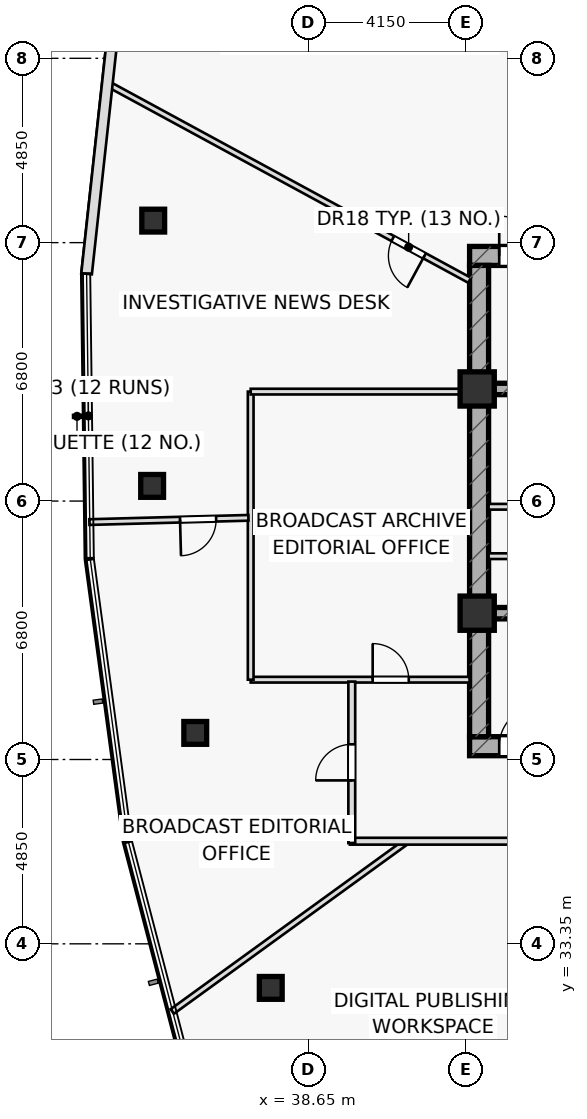
"""IFC4 building model, lengths in metres.
Left out: names, types, materials, properties, quantities, classifications, styles, units other than length and angle.
Written with IfcOpenShell. Run it as: python <this file> out.ifc"""

import sys

from ifc_helpers import new_model, si_unit, direction, frame, frame_2d, origin, origin_2d, place, context, subcontext, project, spatial, rectangle, hollow_rectangle, extrude, element, fill, save


model = new_model("IFC4")
c1 = context("Model", 3, precision=1e-05, world=origin(), true_north=direction((0.0, 1.0)))
c2 = subcontext(c1, "Body", "Model", "MODEL_VIEW")
j1 = project(units=[si_unit("LENGTHUNIT", "METRE"), si_unit("PLANEANGLEUNIT", "RADIAN")], contexts=[c1])
p1 = place(None, origin())
s1 = spatial("IfcSite", under=j1, at=p1, CompositionType="ELEMENT")
p2 = place(p1, origin())
s2 = spatial("IfcBuilding", under=s1, at=p2, CompositionType="ELEMENT")
p3 = place(p2, frame((0.0, 0.0, 177.2)))
s3 = spatial("IfcBuildingStorey", under=s2, at=p3, CompositionType="ELEMENT", Elevation=177.2)
p4 = place(p3, frame((42.9, 51.45, 0.0), z_axis=(0.0, 0.0, 1.0), x_axis=(1.0, 0.0, 0.0)))
e1 = element("IfcWall", 1, at=p4, inside=s3, PredefinedType="SHEAR", context=c2, shape_type="SweptSolid", body=[
    extrude(rectangle(XDim=14.2, YDim=0.5, at=frame_2d((7.1, 0.0))), origin(), (0.0, 0.0, 1.0), 3.55),
])
p5 = place(p4, frame((0.78, 0.0, 0.0)))
e2 = element("IfcOpeningElement", 2, at=p5, cuts=e1, PredefinedType="OPENING", context=c2, shape_type="SweptSolid", body=[
    extrude(rectangle(XDim=1.05, YDim=2.2, at=frame_2d((0.525, 1.1))), frame((0.0, 0.26, 0.0), z_axis=(0.0, -1.0, 0.0), x_axis=(1.0, 0.0, 0.0)), (0.0, 0.0, 1.0), 0.52),
])
p6 = place(p3, frame((42.9, 38.55, 0.0), z_axis=(0.0, 0.0, 1.0), x_axis=(1.0, 0.0, 0.0)))
e3 = element("IfcWall", 3, at=p6, inside=s3, PredefinedType="SHEAR", context=c2, shape_type="SweptSolid", body=[
    extrude(rectangle(XDim=14.2, YDim=0.5, at=frame_2d((7.1, 0.0))), origin(), (0.0, 0.0, 1.0), 3.55),
])
p7 = place(p6, frame((0.78, 0.0, 0.0)))
e4 = element("IfcOpeningElement", 4, at=p7, cuts=e3, PredefinedType="OPENING", context=c2, shape_type="SweptSolid", body=[
    extrude(rectangle(XDim=1.05, YDim=2.2, at=frame_2d((0.525, 1.1))), frame((0.0, 0.26, 0.0), z_axis=(0.0, -1.0, 0.0), x_axis=(1.0, 0.0, 0.0)), (0.0, 0.0, 1.0), 0.52),
])
p8 = place(p3, frame((43.15, 38.8, 0.0), z_axis=(0.0, 0.0, 1.0), x_axis=(0.0, 1.0, 0.0)))
e5 = element("IfcWall", 5, at=p8, inside=s3, PredefinedType="SHEAR", context=c2, shape_type="SweptSolid", body=[
    extrude(rectangle(XDim=12.4, YDim=0.5, at=frame_2d((6.2, 0.0))), origin(), (0.0, 0.0, 1.0), 3.55),
])
p9 = place(p3, frame((43.4, 47.95, 0.0), z_axis=(0.0, 0.0, 1.0), x_axis=(1.0, 0.0, 0.0)))
e6 = element("IfcWall", 6, at=p9, inside=s3, PredefinedType="SHEAR", context=c2, shape_type="SweptSolid", body=[
    extrude(rectangle(XDim=13.2, YDim=0.3, at=frame_2d((6.6, 0.0))), origin(), (0.0, 0.0, 1.0), 3.55),
])
p10 = place(p9, frame((8.345, 0.0, 0.0)))
e7 = element("IfcOpeningElement", 7, at=p10, cuts=e6, PredefinedType="OPENING", context=c2, shape_type="SweptSolid", body=[
    extrude(rectangle(XDim=1.15, YDim=2.2, at=frame_2d((0.575, 1.1))), frame((0.0, 0.16, 0.0), z_axis=(0.0, -1.0, 0.0), x_axis=(1.0, 0.0, 0.0)), (0.0, 0.0, 1.0), 0.32),
])
p11 = place(p9, frame((10.065, 0.0, 0.0)))
e8 = element("IfcOpeningElement", 8, at=p11, cuts=e6, PredefinedType="OPENING", context=c2, shape_type="SweptSolid", body=[
    extrude(rectangle(XDim=1.15, YDim=2.2, at=frame_2d((0.575, 1.1))), frame((0.0, 0.16, 0.0), z_axis=(0.0, -1.0, 0.0), x_axis=(1.0, 0.0, 0.0)), (0.0, 0.0, 1.0), 0.32),
])
p12 = place(p9, frame((11.645, 0.0, 0.0)))
e9 = element("IfcOpeningElement", 9, at=p12, cuts=e6, PredefinedType="OPENING", context=c2, shape_type="SweptSolid", body=[
    extrude(rectangle(XDim=1.15, YDim=2.2, at=frame_2d((0.575, 1.1))), frame((0.0, 0.16, 0.0), z_axis=(0.0, -1.0, 0.0), x_axis=(1.0, 0.0, 0.0)), (0.0, 0.0, 1.0), 0.32),
])
p13 = place(p3, frame((43.4, 42.05, 0.0), z_axis=(0.0, 0.0, 1.0), x_axis=(1.0, 0.0, 0.0)))
e10 = element("IfcWall", 10, at=p13, inside=s3, PredefinedType="SHEAR", context=c2, shape_type="SweptSolid", body=[
    extrude(rectangle(XDim=13.2, YDim=0.3, at=frame_2d((6.6, 0.0))), origin(), (0.0, 0.0, 1.0), 3.55),
])
p14 = place(p13, frame((8.37, 0.0, 0.0)))
e11 = element("IfcOpeningElement", 11, at=p14, cuts=e10, PredefinedType="OPENING", context=c2, shape_type="SweptSolid", body=[
    extrude(rectangle(XDim=1.1, YDim=2.15, at=frame_2d((0.55, 1.075))), frame((0.0, 0.16, 0.0), z_axis=(0.0, -1.0, 0.0), x_axis=(1.0, 0.0, 0.0)), (0.0, 0.0, 1.0), 0.32),
])
p15 = place(p13, frame((10.09, 0.0, 0.0)))
e12 = element("IfcOpeningElement", 12, at=p15, cuts=e10, PredefinedType="OPENING", context=c2, shape_type="SweptSolid", body=[
    extrude(rectangle(XDim=1.1, YDim=2.15, at=frame_2d((0.55, 1.075))), frame((0.0, 0.16, 0.0), z_axis=(0.0, -1.0, 0.0), x_axis=(1.0, 0.0, 0.0)), (0.0, 0.0, 1.0), 0.32),
])
p16 = place(p13, frame((11.83, 0.0, 0.0)))
e13 = element("IfcOpeningElement", 13, at=p16, cuts=e10, PredefinedType="OPENING", context=c2, shape_type="SweptSolid", body=[
    extrude(rectangle(XDim=1.1, YDim=2.15, at=frame_2d((0.55, 1.075))), frame((0.0, 0.16, 0.0), z_axis=(0.0, -1.0, 0.0), x_axis=(1.0, 0.0, 0.0)), (0.0, 0.0, 1.0), 0.32),
])
for number, where, z_axis, x_axis in (
    (14, (43.1, 47.95, 0.0), (0.0, 0.0, 1.0), (1.0, 0.0, 0.0)),
    (15, (43.1, 42.05, 0.0), (0.0, 0.0, 1.0), (1.0, 0.0, 0.0)),
):
    element("IfcColumn", number, at=place(p3, frame(where, z_axis=z_axis, x_axis=x_axis)), inside=s3, PredefinedType="COLUMN", context=c2, shape_type="SweptSolid", body=[
        extrude(rectangle(XDim=0.9, YDim=0.9, at=origin_2d()), origin(), (0.0, 0.0, 1.0), 3.55),
    ])
for number, where, z_axis, x_axis in (
    (16, (34.575, 52.379, 0.0), (0.0, 0.0, 1.0), (1.0, 0.0, 0.0)),
    (17, (34.546, 45.399, 0.0), (0.0, 0.0, 1.0), (1.0, 0.0, 0.0)),
    (18, (35.681, 38.9, 0.0), (0.0, 0.0, 1.0), (1.0, 0.0, 0.0)),
    (19, (37.668, 32.19, 0.0), (0.0, 0.0, 1.0), (1.0, 0.0, 0.0)),
):
    element("IfcColumn", number, at=place(p3, frame(where, z_axis=z_axis, x_axis=x_axis)), inside=s3, PredefinedType="COLUMN", context=c2, shape_type="SweptSolid", body=[
        extrude(hollow_rectangle(XDim=0.6, YDim=0.6, WallThickness=0.036, at=origin_2d()), origin(), (0.0, 0.0, 1.0), 3.55),
    ])
for number, where, z_axis, x_axis in (
    (20, (43.4, 43.55, 0.0), (0.0, 0.0, 1.0), (1.0, 0.0, 0.0)),
    (21, (43.4, 44.85, 0.0), (0.0, 0.0, 1.0), (1.0, 0.0, 0.0)),
):
    element("IfcWall", number, at=place(p3, frame(where, z_axis=z_axis, x_axis=x_axis)), inside=s3, PredefinedType="PARTITIONING", context=c2, shape_type="SweptSolid", body=[
        extrude(rectangle(XDim=2.35, YDim=0.15, at=frame_2d((1.175, 0.0))), origin(), (0.0, 0.0, 1.0), 3.55),
    ])
p17 = place(p3, frame((37.14, 40.3, 0.0), z_axis=(0.0, 0.0, 1.0), x_axis=(1.0, 0.0, 0.0)))
e22 = element("IfcWall", 22, at=p17, inside=s3, PredefinedType="PARTITIONING", context=c2, shape_type="SweptSolid", body=[
    extrude(rectangle(XDim=5.76, YDim=0.15, at=frame_2d((2.88, 0.0))), origin(), (0.0, 0.0, 1.0), 3.55),
])
p18 = place(p17, frame((3.21, 0.0, 0.0)))
e23 = element("IfcOpeningElement", 23, at=p18, cuts=e22, PredefinedType="OPENING", context=c2, shape_type="SweptSolid", body=[
    extrude(rectangle(XDim=0.95, YDim=2.05, at=frame_2d((0.475, 1.025))), frame((0.0, 0.085, 0.0), z_axis=(0.0, -1.0, 0.0), x_axis=(1.0, 0.0, 0.0)), (0.0, 0.0, 1.0), 0.17),
])
p19 = place(p3, frame((37.14, 40.3, 0.0), z_axis=(0.0, 0.0, 1.0), x_axis=(0.0, 1.0, 0.0)))
e24 = element("IfcWall", 24, at=p19, inside=s3, PredefinedType="PARTITIONING", context=c2, shape_type="SweptSolid", body=[
    extrude(rectangle(XDim=7.58, YDim=0.15, at=frame_2d((3.79, 0.0))), origin(), (0.0, 0.0, 1.0), 2.935),
])
p20 = place(p3, frame((37.14, 47.88, 0.0), z_axis=(0.0, 0.0, 1.0), x_axis=(1.0, 0.0, 0.0)))
e25 = element("IfcWall", 25, at=p20, inside=s3, PredefinedType="PARTITIONING", context=c2, shape_type="SweptSolid", body=[
    extrude(rectangle(XDim=5.76, YDim=0.15, at=frame_2d((2.88, 0.0))), origin(), (0.0, 0.0, 1.0), 2.935),
])
p21 = place(p3, frame((42.9, 50.81, 0.0), z_axis=(0.0, 0.0, 1.0), x_axis=(-0.878810866854, 0.477170263427, 0.0)))
e26 = element("IfcWall", 26, at=p21, inside=s3, PredefinedType="PARTITIONING", context=c2, shape_type="SweptSolid", body=[
    extrude(rectangle(XDim=10.858, YDim=0.15, at=frame_2d((5.429, 0.0))), origin(), (0.0, 0.0, 1.0), 2.935),
])
p22 = place(p21, frame((1.35, 0.0, 0.0)))
e27 = element("IfcOpeningElement", 27, at=p22, cuts=e26, PredefinedType="OPENING", context=c2, shape_type="SweptSolid", body=[
    extrude(rectangle(XDim=0.95, YDim=2.05, at=frame_2d((0.475, 1.025))), frame((0.0, 0.085, 0.0), z_axis=(0.0, -1.0, 0.0), x_axis=(1.0, 0.0, 0.0)), (0.0, 0.0, 1.0), 0.17),
])
p23 = place(p3, frame((37.08, 44.559, 0.0), z_axis=(0.0, 0.0, 1.0), x_axis=(-0.99964326515, -0.026708471324, 0.0)))
e28 = element("IfcWall", 28, at=p23, inside=s3, PredefinedType="PARTITIONING", context=c2, shape_type="SweptSolid", body=[
    extrude(rectangle(XDim=4.187, YDim=0.15, at=frame_2d((2.093, 0.0))), origin(), (0.0, 0.0, 1.0), 3.025),
])
p24 = place(p23, frame((0.85, 0.0, 0.0)))
e29 = element("IfcOpeningElement", 29, at=p24, cuts=e28, PredefinedType="OPENING", context=c2, shape_type="SweptSolid", body=[
    extrude(rectangle(XDim=0.95, YDim=2.05, at=frame_2d((0.475, 1.025))), frame((0.0, 0.085, 0.0), z_axis=(0.0, -1.0, 0.0), x_axis=(1.0, 0.0, 0.0)), (0.0, 0.0, 1.0), 0.17),
])
p25 = place(p3, frame((41.256, 36.05, 0.0), z_axis=(0.0, 0.0, 1.0), x_axis=(-0.809606643128, -0.586972813172, 0.0)))
e30 = element("IfcWall", 30, at=p25, inside=s3, PredefinedType="PARTITIONING", context=c2, shape_type="SweptSolid", body=[
    extrude(rectangle(XDim=7.632, YDim=0.15, at=frame_2d((3.816, 0.0))), origin(), (0.0, 0.0, 1.0), 2.935),
])
p26 = place(p3, frame((48.911, 36.05, 0.0), z_axis=(0.0, 0.0, 1.0), x_axis=(-0.464058704917, -0.885804447037, 0.0)))
e31 = element("IfcWall", 31, at=p26, inside=s3, PredefinedType="PARTITIONING", context=c2, shape_type="SweptSolid", body=[
    extrude(rectangle(XDim=18.7, YDim=0.15, at=frame_2d((9.35, 0.0))), origin(), (0.0, 0.0, 1.0), 2.935),
])
p27 = place(p3, frame((46.896, 54.45, 0.0), z_axis=(0.0, 0.0, 1.0), x_axis=(-0.578628204747, 0.81559144225, 0.0)))
e32 = element("IfcWall", 32, at=p27, inside=s3, PredefinedType="PARTITIONING", context=c2, shape_type="SweptSolid", body=[
    extrude(rectangle(XDim=17.283, YDim=0.15, at=frame_2d((8.642, 0.0))), origin(), (0.0, 0.0, 1.0), 2.935),
])
p28 = place(p27, frame((1.35, 0.0, 0.0)))
e33 = element("IfcOpeningElement", 33, at=p28, cuts=e32, PredefinedType="OPENING", context=c2, shape_type="SweptSolid", body=[
    extrude(rectangle(XDim=0.95, YDim=2.05, at=frame_2d((0.475, 1.025))), frame((0.0, 0.085, 0.0), z_axis=(0.0, -1.0, 0.0), x_axis=(1.0, 0.0, 0.0)), (0.0, 0.0, 1.0), 0.17),
])
p29 = place(p3, frame((59.4, 36.05, 0.0), z_axis=(0.0, 0.0, 1.0), x_axis=(-1.0, 0.0, 0.0)))
e34 = element("IfcWall", 34, at=p29, inside=s3, PredefinedType="PARTITIONING", context=c2, shape_type="SweptSolid", body=[
    extrude(rectangle(XDim=19.65, YDim=0.18, at=frame_2d((9.825, 0.0))), origin(), (0.0, 0.0, 1.0), 2.935),
])
p30 = place(p29, frame((3.374, 0.0, 0.0)))
e35 = element("IfcOpeningElement", 35, at=p30, cuts=e34, PredefinedType="OPENING", context=c2, shape_type="SweptSolid", body=[
    extrude(rectangle(XDim=0.95, YDim=2.05, at=frame_2d((0.475, 1.025))), frame((0.0, 0.1, 0.0), z_axis=(0.0, -1.0, 0.0), x_axis=(1.0, 0.0, 0.0)), (0.0, 0.0, 1.0), 0.2),
])
p31 = place(p29, frame((7.369, 0.0, 0.0)))
e36 = element("IfcOpeningElement", 36, at=p31, cuts=e34, PredefinedType="OPENING", context=c2, shape_type="SweptSolid", body=[
    extrude(rectangle(XDim=0.95, YDim=2.05, at=frame_2d((0.475, 1.025))), frame((0.0, 0.1, 0.0), z_axis=(0.0, -1.0, 0.0), x_axis=(1.0, 0.0, 0.0)), (0.0, 0.0, 1.0), 0.2),
])
p32 = place(p29, frame((13.957, 0.0, 0.0)))
e37 = element("IfcOpeningElement", 37, at=p32, cuts=e34, PredefinedType="OPENING", context=c2, shape_type="SweptSolid", body=[
    extrude(rectangle(XDim=0.95, YDim=2.05, at=frame_2d((0.475, 1.025))), frame((0.0, 0.1, 0.0), z_axis=(0.0, -1.0, 0.0), x_axis=(1.0, 0.0, 0.0)), (0.0, 0.0, 1.0), 0.2),
])
p33 = place(p3, frame((39.8, 36.0, 0.0), z_axis=(0.0, 0.0, 1.0), x_axis=(0.0, 1.0, 0.0)))
e38 = element("IfcWall", 38, at=p33, inside=s3, PredefinedType="PARTITIONING", context=c2, shape_type="SweptSolid", body=[
    extrude(rectangle(XDim=4.25, YDim=0.18, at=frame_2d((2.125, 0.0))), origin(), (0.0, 0.0, 1.0), 2.935),
])
p34 = place(p33, frame((1.65, 0.0, 0.0)))
e39 = element("IfcOpeningElement", 39, at=p34, cuts=e38, PredefinedType="OPENING", context=c2, shape_type="SweptSolid", body=[
    extrude(rectangle(XDim=0.95, YDim=2.05, at=frame_2d((0.475, 1.025))), frame((0.0, 0.1, 0.0), z_axis=(0.0, -1.0, 0.0), x_axis=(1.0, 0.0, 0.0)), (0.0, 0.0, 1.0), 0.2),
])
p35 = place(p3, frame((33.638, 58.46, 0.0), z_axis=(0.0, 0.0, 1.0), x_axis=(-0.108447510175, -0.994102176608, 0.0)))
e40 = element("IfcWall", 40, at=p35, inside=s3, PredefinedType="STANDARD", context=c2, shape_type="SweptSolid", body=[
    extrude(rectangle(XDim=7.524, YDim=0.28, at=frame_2d((3.762, 0.0))), origin(), (0.0, 0.0, 1.0), 3.55),
])
p36 = place(p5, origin())
e41 = element("IfcDoor", 41, at=p36, inside=s3, OperationType="SINGLE_SWING_LEFT", PredefinedType="DOOR", context=c2, shape_type="SweptSolid", body=[
    extrude(rectangle(XDim=1.05, YDim=2.2, at=frame_2d((0.525, 1.1))), frame((0.0, 0.025, 0.0), z_axis=(0.0, -1.0, 0.0), x_axis=(1.0, 0.0, 0.0)), (0.0, 0.0, 1.0), 0.05),
])
fill(e2, e41)
p37 = place(p7, origin())
e42 = element("IfcDoor", 42, at=p37, inside=s3, OperationType="SINGLE_SWING_RIGHT", PredefinedType="DOOR", context=c2, shape_type="SweptSolid", body=[
    extrude(rectangle(XDim=1.05, YDim=2.2, at=frame_2d((0.525, 1.1))), frame((0.0, 0.025, 0.0), z_axis=(0.0, -1.0, 0.0), x_axis=(1.0, 0.0, 0.0)), (0.0, 0.0, 1.0), 0.05),
])
fill(e4, e42)
p38 = place(p18, origin())
e43 = element("IfcDoor", 43, at=p38, inside=s3, OperationType="SINGLE_SWING_LEFT", PredefinedType="DOOR", context=c2, shape_type="SweptSolid", body=[
    extrude(rectangle(XDim=0.95, YDim=2.05, at=frame_2d((0.475, 1.025))), frame((0.0, 0.025, 0.0), z_axis=(0.0, -1.0, 0.0), x_axis=(1.0, 0.0, 0.0)), (0.0, 0.0, 1.0), 0.05),
])
fill(e23, e43)
p39 = place(p22, origin())
e44 = element("IfcDoor", 44, at=p39, inside=s3, OperationType="SINGLE_SWING_LEFT", PredefinedType="DOOR", context=c2, shape_type="SweptSolid", body=[
    extrude(rectangle(XDim=0.95, YDim=2.05, at=frame_2d((0.475, 1.025))), frame((0.0, 0.025, 0.0), z_axis=(0.0, -1.0, 0.0), x_axis=(1.0, 0.0, 0.0)), (0.0, 0.0, 1.0), 0.05),
])
fill(e27, e44)
p40 = place(p24, origin())
e45 = element("IfcDoor", 45, at=p40, inside=s3, OperationType="SINGLE_SWING_RIGHT", PredefinedType="DOOR", context=c2, shape_type="SweptSolid", body=[
    extrude(rectangle(XDim=0.95, YDim=2.05, at=frame_2d((0.475, 1.025))), frame((0.0, 0.025, 0.0), z_axis=(0.0, -1.0, 0.0), x_axis=(1.0, 0.0, 0.0)), (0.0, 0.0, 1.0), 0.05),
])
fill(e29, e45)
p41 = place(p34, origin())
e46 = element("IfcDoor", 46, at=p41, inside=s3, OperationType="SINGLE_SWING_LEFT", PredefinedType="DOOR", context=c2, shape_type="SweptSolid", body=[
    extrude(rectangle(XDim=0.95, YDim=2.05, at=frame_2d((0.475, 1.025))), frame((0.0, 0.025, 0.0), z_axis=(0.0, -1.0, 0.0), x_axis=(1.0, 0.0, 0.0)), (0.0, 0.0, 1.0), 0.05),
])
fill(e39, e46)
save(model, sys.argv[1])
